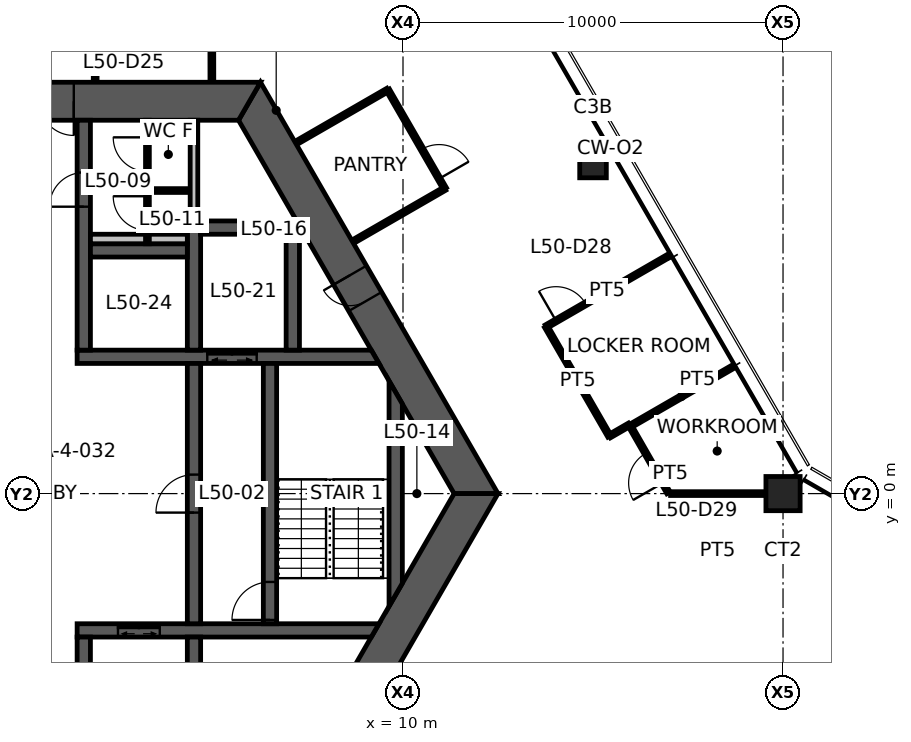
"""IFC4 building model, lengths in metres.
Left out: names, types, materials, properties, quantities, classifications, styles, units other than length and angle.
Written with IfcOpenShell. Run it as: python <this file> out.ifc"""

import sys

from ifc_helpers import new_model, si_unit, direction, frame, frame_2d, origin, origin_2d, place, context, subcontext, project, spatial, polyline, rectangle, hollow_rectangle, outline, extrude, element, fill, save


model = new_model("IFC4")
c1 = context("Model", 3, precision=1e-05, world=origin(), true_north=direction((0.0, 1.0)))
c2 = subcontext(c1, "Body", "Model", "MODEL_VIEW")
j1 = project(units=[si_unit("LENGTHUNIT", "METRE"), si_unit("PLANEANGLEUNIT", "RADIAN")], contexts=[c1])
p1 = place(None, origin())
s1 = spatial("IfcSite", under=j1, at=p1, CompositionType="ELEMENT")
p2 = place(p1, origin())
s2 = spatial("IfcBuilding", under=s1, at=p2, CompositionType="ELEMENT")
p3 = place(p2, frame((0.0, 0.0, 199.4)))
s3 = spatial("IfcBuildingStorey", under=s2, at=p3, CompositionType="ELEMENT", Elevation=199.4)
p4 = place(p3, frame((20.0, 0.0, 0.0), z_axis=(0.0, 0.0, 1.0), x_axis=(1.0, 0.0, 0.0)))
e1 = element("IfcColumn", 1, at=p4, inside=s3, PredefinedType="COLUMN", context=c2, shape_type="SweptSolid", body=[
    extrude(hollow_rectangle(XDim=0.9, YDim=0.9, WallThickness=0.09, at=origin_2d()), origin(), (0.0, 0.0, 1.0), 3.9),
])
p5 = place(p3, frame((15.0, 8.66, 0.0), z_axis=(0.0, 0.0, 1.0), x_axis=(1.0, 0.0, 0.0)))
e2 = element("IfcColumn", 2, at=p5, inside=s3, PredefinedType="COLUMN", context=c2, shape_type="SweptSolid", body=[
    extrude(hollow_rectangle(XDim=0.7, YDim=0.7, WallThickness=0.036, at=origin_2d()), origin(), (0.0, 0.0, 1.0), 3.9),
])
p6 = place(p3, frame((11.922, 0.0, 0.0), z_axis=(0.0, 0.0, 1.0), x_axis=(-0.500004296715, 0.866022923061, 0.0)))
e3 = element("IfcWall", 3, at=p6, inside=s3, PredefinedType="SHEAR", context=c2, shape_type="SweptSolid", body=[
    extrude(outline(polyline([(-0.289, -0.5), (5.835, -0.5), (6.635, -0.5), (12.211, -0.5), (11.634, 0.5), (6.635, 0.5), (5.835, 0.5), (0.289, 0.5), (-0.289, -0.5)])), origin(), (0.0, 0.0, 1.0), 3.9),
])
p7 = place(p6, frame((5.835, 0.0, 0.0)))
e4 = element("IfcOpeningElement", 4, at=p7, cuts=e3, PredefinedType="OPENING", context=c2, shape_type="SweptSolid", body=[
    extrude(rectangle(XDim=0.8, YDim=2.1, at=frame_2d((0.4, 1.05))), frame((0.0, 0.51, 0.0), z_axis=(0.0, -1.0, 0.0), x_axis=(1.0, 0.0, 0.0)), (0.0, 0.0, 1.0), 1.02),
])
p8 = place(p3, frame((5.961, 10.325, 0.0), z_axis=(0.0, 0.0, 1.0), x_axis=(-1.0, 0.0, 0.0)))
e5 = element("IfcWall", 5, at=p8, inside=s3, PredefinedType="SHEAR", context=c2, shape_type="SweptSolid", body=[
    extrude(outline(polyline([(-0.289, -0.5), (4.624, -0.5), (5.523, -0.5), (6.399, -0.5), (7.299, -0.5), (12.211, -0.5), (11.634, 0.5), (7.299, 0.5), (6.399, 0.5), (5.523, 0.5), (4.624, 0.5), (0.289, 0.5), (-0.289, -0.5)])), origin(), (0.0, 0.0, 1.0), 3.9),
])
p9 = place(p8, frame((6.399, 0.0, 0.0)))
e6 = element("IfcOpeningElement", 6, at=p9, cuts=e5, PredefinedType="OPENING", context=c2, shape_type="SweptSolid", body=[
    extrude(rectangle(XDim=0.9, YDim=2.1, at=frame_2d((0.45, 1.05))), frame((0.0, 0.51, 0.0), z_axis=(0.0, -1.0, 0.0), x_axis=(1.0, 0.0, 0.0)), (0.0, 0.0, 1.0), 1.02),
])
p10 = place(p8, frame((4.624, 0.0, 0.0)))
e7 = element("IfcOpeningElement", 7, at=p10, cuts=e5, PredefinedType="OPENING", context=c2, shape_type="SweptSolid", body=[
    extrude(rectangle(XDim=0.9, YDim=2.1, at=frame_2d((0.45, 1.05))), frame((0.0, 0.51, 0.0), z_axis=(0.0, -1.0, 0.0), x_axis=(1.0, 0.0, 0.0)), (0.0, 0.0, 1.0), 1.02),
])
p11 = place(p3, frame((5.961, -10.325, 0.0), z_axis=(0.0, 0.0, 1.0), x_axis=(0.500004296715, 0.866022923061, 0.0)))
e8 = element("IfcWall", 8, at=p11, inside=s3, PredefinedType="SHEAR", context=c2, shape_type="SweptSolid", body=[
    extrude(outline(polyline([(-0.289, -0.5), (4.594, -0.5), (5.394, -0.5), (12.211, -0.5), (11.634, 0.5), (5.394, 0.5), (4.594, 0.5), (0.289, 0.5), (-0.289, -0.5)])), origin(), (0.0, 0.0, 1.0), 3.9),
])
p12 = place(p11, frame((4.594, 0.0, 0.0)))
e9 = element("IfcOpeningElement", 9, at=p12, cuts=e8, PredefinedType="OPENING", context=c2, shape_type="SweptSolid", body=[
    extrude(rectangle(XDim=0.8, YDim=2.1, at=frame_2d((0.4, 1.05))), frame((0.0, 0.51, 0.0), z_axis=(0.0, -1.0, 0.0), x_axis=(1.0, 0.0, 0.0)), (0.0, 0.0, 1.0), 1.02),
])
p13 = place(p3, frame((1.425, 3.6, 0.0), z_axis=(0.0, 0.0, 1.0), x_axis=(1.0, 0.0, 0.0)))
e10 = element("IfcWall", 10, at=p13, inside=s3, PredefinedType="SHEAR", context=c2, shape_type="SweptSolid", body=[
    extrude(outline(polyline([(0.0, -0.175), (3.425, -0.175), (4.725, -0.175), (7.942, -0.175), (7.74, 0.175), (4.725, 0.175), (3.425, 0.175), (0.0, 0.175), (0.0, -0.175)])), origin(), (0.0, 0.0, 1.0), 3.9),
])
p14 = place(p13, frame((3.425, 0.0, 0.0)))
e11 = element("IfcOpeningElement", 11, at=p14, cuts=e10, PredefinedType="OPENING", context=c2, shape_type="SweptSolid", body=[
    extrude(rectangle(XDim=1.3, YDim=2.1, at=frame_2d((0.65, 1.05))), frame((0.0, 0.185, 0.0), z_axis=(0.0, -1.0, 0.0), x_axis=(1.0, 0.0, 0.0)), (0.0, 0.0, 1.0), 0.37),
])
p15 = place(p3, frame((1.425, -3.6, 0.0), z_axis=(0.0, 0.0, 1.0), x_axis=(1.0, 0.0, 0.0)))
e12 = element("IfcWall", 12, at=p15, inside=s3, PredefinedType="SHEAR", context=c2, shape_type="SweptSolid", body=[
    extrude(outline(polyline([(0.0, -0.175), (1.075, -0.175), (2.175, -0.175), (7.74, -0.175), (7.942, 0.175), (2.175, 0.175), (1.075, 0.175), (0.0, 0.175), (0.0, -0.175)])), origin(), (0.0, 0.0, 1.0), 3.9),
])
p16 = place(p15, frame((1.075, 0.0, 0.0)))
e13 = element("IfcOpeningElement", 13, at=p16, cuts=e12, PredefinedType="OPENING", context=c2, shape_type="SweptSolid", body=[
    extrude(rectangle(XDim=1.1, YDim=2.1, at=frame_2d((0.55, 1.05))), frame((0.0, 0.185, 0.0), z_axis=(0.0, -1.0, 0.0), x_axis=(1.0, 0.0, 0.0)), (0.0, 0.0, 1.0), 0.37),
])
p17 = place(p3, frame((1.6, 3.775, 0.0), z_axis=(0.0, 0.0, 1.0), x_axis=(0.0, 1.0, 0.0)))
e14 = element("IfcWall", 14, at=p17, inside=s3, PredefinedType="SHEAR", context=c2, shape_type="SweptSolid", body=[
    extrude(rectangle(XDim=6.05, YDim=0.35, at=frame_2d((3.025, 0.0))), origin(), (0.0, 0.0, 1.0), 3.9),
])
p18 = place(p17, frame((3.775, 0.0, 0.0)))
e15 = element("IfcOpeningElement", 15, at=p18, cuts=e14, PredefinedType="OPENING", context=c2, shape_type="SweptSolid", body=[
    extrude(rectangle(XDim=0.9, YDim=2.1, at=frame_2d((0.45, 1.05))), frame((0.0, 0.185, 0.0), z_axis=(0.0, -1.0, 0.0), x_axis=(1.0, 0.0, 0.0)), (0.0, 0.0, 1.0), 0.37),
])
p19 = place(p3, frame((1.6, -3.775, 0.0), z_axis=(0.0, 0.0, 1.0), x_axis=(0.0, -1.0, 0.0)))
e16 = element("IfcWall", 16, at=p19, inside=s3, PredefinedType="SHEAR", context=c2, shape_type="SweptSolid", body=[
    extrude(rectangle(XDim=6.05, YDim=0.35, at=frame_2d((3.025, 0.0))), origin(), (0.0, 0.0, 1.0), 3.9),
])
p20 = place(p19, frame((3.625, 0.0, 0.0)))
e17 = element("IfcOpeningElement", 17, at=p20, cuts=e16, PredefinedType="OPENING", context=c2, shape_type="SweptSolid", body=[
    extrude(rectangle(XDim=1.2, YDim=2.1, at=frame_2d((0.6, 1.05))), frame((0.0, 0.185, 0.0), z_axis=(0.0, -1.0, 0.0), x_axis=(1.0, 0.0, 0.0)), (0.0, 0.0, 1.0), 0.37),
])
p21 = place(p3, frame((4.5, -3.425, 0.0), z_axis=(0.0, 0.0, 1.0), x_axis=(0.0, 1.0, 0.0)))
e18 = element("IfcWall", 18, at=p21, inside=s3, PredefinedType="SHEAR", context=c2, shape_type="SweptSolid", body=[
    extrude(rectangle(XDim=6.85, YDim=0.35, at=frame_2d((3.425, 0.0))), origin(), (0.0, 0.0, 1.0), 3.9),
])
p22 = place(p21, frame((2.925, 0.0, 0.0)))
e19 = element("IfcOpeningElement", 19, at=p22, cuts=e18, PredefinedType="OPENING", context=c2, shape_type="SweptSolid", body=[
    extrude(rectangle(XDim=1.0, YDim=2.1, at=frame_2d((0.5, 1.05))), frame((0.0, 0.185, 0.0), z_axis=(0.0, -1.0, 0.0), x_axis=(1.0, 0.0, 0.0)), (0.0, 0.0, 1.0), 0.37),
])
p23 = place(p3, frame((6.5, -3.425, 0.0), z_axis=(0.0, 0.0, 1.0), x_axis=(0.0, 1.0, 0.0)))
e20 = element("IfcWall", 20, at=p23, inside=s3, PredefinedType="SHEAR", context=c2, shape_type="SweptSolid", body=[
    extrude(rectangle(XDim=6.85, YDim=0.35, at=frame_2d((3.425, 0.0))), origin(), (0.0, 0.0, 1.0), 3.9),
])
p24 = place(p23, frame((0.1, 0.0, 0.0)))
e21 = element("IfcOpeningElement", 21, at=p24, cuts=e20, PredefinedType="OPENING", context=c2, shape_type="SweptSolid", body=[
    extrude(rectangle(XDim=1.0, YDim=2.1, at=frame_2d((0.5, 1.05))), frame((0.0, 0.185, 0.0), z_axis=(0.0, -1.0, 0.0), x_axis=(1.0, 0.0, 0.0)), (0.0, 0.0, 1.0), 0.37),
])
p25 = place(p3, frame((4.5, 3.775, 0.0), z_axis=(0.0, 0.0, 1.0), x_axis=(0.0, 1.0, 0.0)))
e22 = element("IfcWall", 22, at=p25, inside=s3, PredefinedType="SHEAR", context=c2, shape_type="SweptSolid", body=[
    extrude(rectangle(XDim=3.4, YDim=0.35, at=frame_2d((1.7, 0.0))), origin(), (0.0, 0.0, 1.0), 3.9),
])
p26 = place(p3, frame((4.5, -3.775, 0.0), z_axis=(0.0, 0.0, 1.0), x_axis=(0.0, -1.0, 0.0)))
e23 = element("IfcWall", 23, at=p26, inside=s3, PredefinedType="SHEAR", context=c2, shape_type="SweptSolid", body=[
    extrude(rectangle(XDim=6.05, YDim=0.35, at=frame_2d((3.025, 0.0))), origin(), (0.0, 0.0, 1.0), 3.9),
])
p27 = place(p3, frame((1.775, 6.4, 0.0), z_axis=(0.0, 0.0, 1.0), x_axis=(1.0, 0.0, 0.0)))
e24 = element("IfcWall", 24, at=p27, inside=s3, PredefinedType="SHEAR", context=c2, shape_type="SweptSolid", body=[
    extrude(rectangle(XDim=2.55, YDim=0.35, at=frame_2d((1.275, 0.0))), origin(), (0.0, 0.0, 1.0), 3.9),
])
p28 = place(p3, frame((4.675, 7.0, 0.0), z_axis=(0.0, 0.0, 1.0), x_axis=(1.0, 0.0, 0.0)))
e25 = element("IfcWall", 25, at=p28, inside=s3, PredefinedType="SHEAR", context=c2, shape_type="SweptSolid", body=[
    extrude(rectangle(XDim=2.25, YDim=0.35, at=frame_2d((1.125, 0.0))), origin(), (0.0, 0.0, 1.0), 3.9),
])
p29 = place(p3, frame((7.1, 3.775, 0.0), z_axis=(0.0, 0.0, 1.0), x_axis=(0.0, 1.0, 0.0)))
e26 = element("IfcWall", 26, at=p29, inside=s3, PredefinedType="SHEAR", context=c2, shape_type="SweptSolid", body=[
    extrude(outline(polyline([(0.0, -0.175), (3.274, -0.175), (3.4, 0.0), (3.4, 0.175), (0.0, 0.175), (0.0, -0.175)])), origin(), (0.0, 0.0, 1.0), 3.9),
])
p30 = place(p3, frame((9.808, -2.662, 0.0), z_axis=(0.0, 0.0, 1.0), x_axis=(0.0, 1.0, 0.0)))
e27 = element("IfcWall", 27, at=p30, inside=s3, PredefinedType="SHEAR", context=c2, shape_type="SweptSolid", body=[
    extrude(outline(polyline([(0.303, -0.175), (5.021, -0.175), (5.628, 0.175), (-0.303, 0.175), (0.303, -0.175)])), origin(), (0.0, 0.0, 1.0), 3.9),
])
p31 = place(p3, frame((4.5, 7.175, 0.0), z_axis=(0.0, 0.0, 1.0), x_axis=(0.0, 1.0, 0.0)))
e28 = element("IfcWall", 28, at=p31, inside=s3, PredefinedType="STANDARD", context=c2, shape_type="SweptSolid", body=[
    extrude(rectangle(XDim=2.65, YDim=0.2, at=frame_2d((1.325, 0.0))), origin(), (0.0, 0.0, 1.0), 3.9),
])
p32 = place(p3, frame((1.775, 6.7, 0.0), z_axis=(0.0, 0.0, 1.0), x_axis=(1.0, 0.0, 0.0)))
e29 = element("IfcWall", 29, at=p32, inside=s3, PredefinedType="PLUMBINGWALL", context=c2, shape_type="SweptSolid", body=[
    extrude(rectangle(XDim=2.55, YDim=0.25, at=frame_2d((1.275, 0.0))), origin(), (0.0, 0.0, 1.0), 3.9),
])
p33 = place(p3, frame((3.275, 6.575, 0.0), z_axis=(0.0, 0.0, 1.0), x_axis=(0.0, 1.0, 0.0)))
e30 = element("IfcWall", 30, at=p33, inside=s3, PredefinedType="PARTITIONING", context=c2, shape_type="SweptSolid", body=[
    extrude(rectangle(XDim=3.25, YDim=0.1, at=frame_2d((1.625, 0.0))), origin(), (0.0, 0.0, 1.0), 2.35),
])
p34 = place(p33, frame((1.9, 0.0, 0.0)))
e31 = element("IfcOpeningElement", 31, at=p34, cuts=e30, PredefinedType="OPENING", context=c2, shape_type="SweptSolid", body=[
    extrude(rectangle(XDim=0.9, YDim=2.1, at=frame_2d((0.45, 1.05))), frame((0.0, 0.06, 0.0), z_axis=(0.0, -1.0, 0.0), x_axis=(1.0, 0.0, 0.0)), (0.0, 0.0, 1.0), 0.12),
])
p35 = place(p33, frame((0.35, 0.0, 0.0)))
e32 = element("IfcOpeningElement", 32, at=p35, cuts=e30, PredefinedType="OPENING", context=c2, shape_type="SweptSolid", body=[
    extrude(rectangle(XDim=0.9, YDim=2.1, at=frame_2d((0.45, 1.05))), frame((0.0, 0.06, 0.0), z_axis=(0.0, -1.0, 0.0), x_axis=(1.0, 0.0, 0.0)), (0.0, 0.0, 1.0), 0.12),
])
p36 = place(p3, frame((3.325, 7.975, 0.0), z_axis=(0.0, 0.0, 1.0), x_axis=(1.0, 0.0, 0.0)))
e33 = element("IfcWall", 33, at=p36, inside=s3, PredefinedType="PARTITIONING", context=c2, shape_type="SweptSolid", body=[
    extrude(rectangle(XDim=1.0, YDim=0.1, at=frame_2d((0.5, 0.0))), origin(), (0.0, 0.0, 1.0), 2.35),
])
for number, where, z_axis, x_axis in (
    (34, (1.9, 10.845, 0.0), (0.0, 0.0, 1.0), (0.002, 1.0, 0.0)),
    (35, (4.966, 13.625, 0.0), (0.0, 0.0, 1.0), (0.002, -1.0, 0.0)),
):
    element("IfcWall", number, at=place(p3, frame(where, z_axis=z_axis, x_axis=x_axis)), inside=s3, PredefinedType="PARTITIONING", context=c2, shape_type="SweptSolid", body=[
        extrude(rectangle(XDim=2.78, YDim=0.1, at=frame_2d((1.39, 0.0))), origin(), (0.0, 0.0, 1.0), 2.35),
    ])
p37 = place(p3, frame((7.192, 9.233, 0.0), z_axis=(0.0, 0.0, 1.0), x_axis=(0.866018876994, 0.500011304563, 0.0)))
e36 = element("IfcWall", 36, at=p37, inside=s3, PredefinedType="PARTITIONING", context=c2, shape_type="SweptSolid", body=[
    extrude(rectangle(XDim=2.78, YDim=0.1, at=frame_2d((1.39, 0.0))), origin(), (0.0, 0.0, 1.0), 2.35),
])
p38 = place(p3, frame((9.6, 10.623, 0.0), z_axis=(0.0, 0.0, 1.0), x_axis=(0.499990139034, -0.866031096941, 0.0)))
e37 = element("IfcWall", 37, at=p38, inside=s3, PredefinedType="PARTITIONING", context=c2, shape_type="SweptSolid", body=[
    extrude(rectangle(XDim=3.0, YDim=0.1, at=frame_2d((1.5, 0.0))), origin(), (0.0, 0.0, 1.0), 2.35),
])
p39 = place(p38, frame((1.8, 0.0, 0.0)))
e38 = element("IfcOpeningElement", 38, at=p39, cuts=e37, PredefinedType="OPENING", context=c2, shape_type="SweptSolid", body=[
    extrude(rectangle(XDim=0.9, YDim=2.1, at=frame_2d((0.45, 1.05))), frame((0.0, 0.06, 0.0), z_axis=(0.0, -1.0, 0.0), x_axis=(1.0, 0.0, 0.0)), (0.0, 0.0, 1.0), 0.12),
])
p40 = place(p3, frame((11.1, 8.025, 0.0), z_axis=(0.0, 0.0, 1.0), x_axis=(-0.866056901187, -0.49994544093, 0.0)))
e39 = element("IfcWall", 39, at=p40, inside=s3, PredefinedType="PARTITIONING", context=c2, shape_type="SweptSolid", body=[
    extrude(rectangle(XDim=2.78, YDim=0.1, at=frame_2d((1.39, 0.0))), origin(), (0.0, 0.0, 1.0), 2.35),
])
p41 = place(p3, frame((18.679, 3.335, 0.0), z_axis=(0.0, 0.0, 1.0), x_axis=(-0.866045268016, -0.499965592563, 0.0)))
e40 = element("IfcWall", 40, at=p41, inside=s3, PredefinedType="PARTITIONING", context=c2, shape_type="SweptSolid", body=[
    extrude(rectangle(XDim=3.129, YDim=0.1, at=frame_2d((1.564, 0.0))), origin(), (0.0, 0.0, 1.0), 2.35),
])
p42 = place(p3, frame((13.767, 4.395, 0.0), z_axis=(0.0, 0.0, 1.0), x_axis=(0.866028673236, 0.499994337101, 0.0)))
e41 = element("IfcWall", 41, at=p42, inside=s3, PredefinedType="PARTITIONING", context=c2, shape_type="SweptSolid", body=[
    extrude(rectangle(XDim=3.705, YDim=0.1, at=frame_2d((1.853, 0.0))), origin(), (0.0, 0.0, 1.0), 2.35),
])
p43 = place(p42, frame((0.3, 0.0, 0.0)))
e42 = element("IfcOpeningElement", 42, at=p43, cuts=e41, PredefinedType="OPENING", context=c2, shape_type="SweptSolid", body=[
    extrude(rectangle(XDim=0.9, YDim=2.1, at=frame_2d((0.45, 1.05))), frame((0.0, 0.06, 0.0), z_axis=(0.0, -1.0, 0.0), x_axis=(1.0, 0.0, 0.0)), (0.0, 0.0, 1.0), 0.12),
])
p44 = place(p3, frame((15.433, 1.51, 0.0), z_axis=(0.0, 0.0, 1.0), x_axis=(-0.500001606164, 0.866024476463, 0.0)))
e43 = element("IfcWall", 43, at=p44, inside=s3, PredefinedType="PARTITIONING", context=c2, shape_type="SweptSolid", body=[
    extrude(rectangle(XDim=3.331, YDim=0.1, at=frame_2d((1.666, 0.0))), origin(), (0.0, 0.0, 1.0), 2.35),
])
p45 = place(p3, frame((15.956, 1.813, 0.0), z_axis=(0.0, 0.0, 1.0), x_axis=(-0.865997239347, -0.500048779063, 0.0)))
e44 = element("IfcWall", 44, at=p45, inside=s3, PredefinedType="PARTITIONING", context=c2, shape_type="SweptSolid", body=[
    extrude(rectangle(XDim=0.604, YDim=0.1, at=frame_2d((0.302, 0.0))), origin(), (0.0, 0.0, 1.0), 2.35),
])
p46 = place(p3, frame((16.986, 0.02, 0.0), z_axis=(0.0, 0.0, 1.0), x_axis=(-0.498033790128, 0.86715762344, 0.0)))
e45 = element("IfcWall", 45, at=p46, inside=s3, PredefinedType="PARTITIONING", context=c2, shape_type="SweptSolid", body=[
    extrude(rectangle(XDim=2.025, YDim=0.1, at=frame_2d((1.012, 0.0))), origin(), (0.0, 0.0, 1.0), 2.35),
])
p47 = place(p46, frame((0.3, 0.0, 0.0)))
e46 = element("IfcOpeningElement", 46, at=p47, cuts=e45, PredefinedType="OPENING", context=c2, shape_type="SweptSolid", body=[
    extrude(rectangle(XDim=0.9, YDim=2.1, at=frame_2d((0.45, 1.05))), frame((0.0, 0.06, 0.0), z_axis=(0.0, -1.0, 0.0), x_axis=(1.0, 0.0, 0.0)), (0.0, 0.0, 1.0), 0.12),
])
p48 = place(p3, frame((20.792, -5.769, 0.0), z_axis=(0.0, 0.0, 1.0), x_axis=(0.500005339912, 0.866022320763, 0.0)))
e47 = element("IfcWall", 47, at=p48, inside=s3, PredefinedType="PARTITIONING", context=c2, shape_type="SweptSolid", body=[
    extrude(rectangle(XDim=5.08, YDim=0.1, at=frame_2d((2.54, 0.0))), origin(), (0.0, 0.0, 1.0), 2.35),
])
p49 = place(p3, frame((19.519, 0.0, 0.0), z_axis=(0.0, 0.0, 1.0), x_axis=(-1.0, 0.0, 0.0)))
e48 = element("IfcWall", 48, at=p49, inside=s3, PredefinedType="PARTITIONING", context=c2, shape_type="SweptSolid", body=[
    extrude(rectangle(XDim=2.478, YDim=0.1, at=frame_2d((1.239, 0.0))), origin(), (0.0, 0.0, 1.0), 2.35),
])
p50 = place(p10, origin())
e49 = element("IfcDoor", 49, at=p50, inside=s3, OperationType="SINGLE_SWING_LEFT", PredefinedType="DOOR", context=c2, shape_type="SweptSolid", body=[
    extrude(rectangle(XDim=0.9, YDim=2.1, at=frame_2d((0.45, 1.05))), frame((0.0, 0.025, 0.0), z_axis=(0.0, -1.0, 0.0), x_axis=(1.0, 0.0, 0.0)), (0.0, 0.0, 1.0), 0.05),
])
fill(e7, e49)
p51 = place(p7, origin())
e50 = element("IfcDoor", 50, at=p51, inside=s3, OperationType="SINGLE_SWING_RIGHT", PredefinedType="DOOR", context=c2, shape_type="SweptSolid", body=[
    extrude(rectangle(XDim=0.8, YDim=2.1, at=frame_2d((0.4, 1.05))), frame((0.0, 0.025, 0.0), z_axis=(0.0, -1.0, 0.0), x_axis=(1.0, 0.0, 0.0)), (0.0, 0.0, 1.0), 0.05),
])
fill(e4, e50)
p52 = place(p22, origin())
e51 = element("IfcDoor", 51, at=p52, inside=s3, OperationType="SINGLE_SWING_LEFT", PredefinedType="DOOR", context=c2, shape_type="SweptSolid", body=[
    extrude(rectangle(XDim=1.0, YDim=2.1, at=frame_2d((0.5, 1.05))), frame((0.0, 0.025, 0.0), z_axis=(0.0, -1.0, 0.0), x_axis=(1.0, 0.0, 0.0)), (0.0, 0.0, 1.0), 0.05),
])
fill(e19, e51)
p53 = place(p24, origin())
e52 = element("IfcDoor", 52, at=p53, inside=s3, OperationType="SINGLE_SWING_LEFT", PredefinedType="DOOR", context=c2, shape_type="SweptSolid", body=[
    extrude(rectangle(XDim=1.0, YDim=2.1, at=frame_2d((0.5, 1.05))), frame((0.0, 0.025, 0.0), z_axis=(0.0, -1.0, 0.0), x_axis=(1.0, 0.0, 0.0)), (0.0, 0.0, 1.0), 0.05),
])
fill(e21, e52)
p54 = place(p18, origin())
e53 = element("IfcDoor", 53, at=p54, inside=s3, OperationType="SINGLE_SWING_LEFT", PredefinedType="DOOR", context=c2, shape_type="SweptSolid", body=[
    extrude(rectangle(XDim=0.9, YDim=2.1, at=frame_2d((0.45, 1.05))), frame((0.0, 0.025, 0.0), z_axis=(0.0, -1.0, 0.0), x_axis=(1.0, 0.0, 0.0)), (0.0, 0.0, 1.0), 0.05),
])
fill(e15, e53)
p55 = place(p34, origin())
e54 = element("IfcDoor", 54, at=p55, inside=s3, OperationType="SINGLE_SWING_RIGHT", PredefinedType="DOOR", context=c2, shape_type="SweptSolid", body=[
    extrude(rectangle(XDim=0.9, YDim=2.1, at=frame_2d((0.45, 1.05))), frame((0.0, 0.025, 0.0), z_axis=(0.0, -1.0, 0.0), x_axis=(1.0, 0.0, 0.0)), (0.0, 0.0, 1.0), 0.05),
])
fill(e31, e54)
p56 = place(p35, origin())
e55 = element("IfcDoor", 55, at=p56, inside=s3, OperationType="SINGLE_SWING_RIGHT", PredefinedType="DOOR", context=c2, shape_type="SweptSolid", body=[
    extrude(rectangle(XDim=0.9, YDim=2.1, at=frame_2d((0.45, 1.05))), frame((0.0, 0.025, 0.0), z_axis=(0.0, -1.0, 0.0), x_axis=(1.0, 0.0, 0.0)), (0.0, 0.0, 1.0), 0.05),
])
fill(e32, e55)
p57 = place(p39, origin())
e56 = element("IfcDoor", 56, at=p57, inside=s3, OperationType="SINGLE_SWING_RIGHT", PredefinedType="DOOR", context=c2, shape_type="SweptSolid", body=[
    extrude(rectangle(XDim=0.9, YDim=2.1, at=frame_2d((0.45, 1.05))), frame((0.0, 0.025, 0.0), z_axis=(0.0, -1.0, 0.0), x_axis=(1.0, 0.0, 0.0)), (0.0, 0.0, 1.0), 0.05),
])
fill(e38, e56)
p58 = place(p43, origin())
e57 = element("IfcDoor", 57, at=p58, inside=s3, OperationType="SINGLE_SWING_LEFT", PredefinedType="DOOR", context=c2, shape_type="SweptSolid", body=[
    extrude(rectangle(XDim=0.9, YDim=2.1, at=frame_2d((0.45, 1.05))), frame((0.0, 0.025, 0.0), z_axis=(0.0, -1.0, 0.0), x_axis=(1.0, 0.0, 0.0)), (0.0, 0.0, 1.0), 0.05),
])
fill(e42, e57)
p59 = place(p47, origin())
e58 = element("IfcDoor", 58, at=p59, inside=s3, OperationType="SINGLE_SWING_LEFT", PredefinedType="DOOR", context=c2, shape_type="SweptSolid", body=[
    extrude(rectangle(XDim=0.9, YDim=2.1, at=frame_2d((0.45, 1.05))), frame((0.0, 0.025, 0.0), z_axis=(0.0, -1.0, 0.0), x_axis=(1.0, 0.0, 0.0)), (0.0, 0.0, 1.0), 0.05),
])
fill(e46, e58)
p60 = place(p16, origin())
e59 = element("IfcDoor", 59, at=p60, inside=s3, OperationType="DOUBLE_DOOR_SLIDING", PredefinedType="DOOR", context=c2, shape_type="SweptSolid", body=[
    extrude(rectangle(XDim=1.1, YDim=2.1, at=frame_2d((0.55, 1.05))), frame((0.0, 0.025, 0.0), z_axis=(0.0, -1.0, 0.0), x_axis=(1.0, 0.0, 0.0)), (0.0, 0.0, 1.0), 0.05),
])
fill(e13, e59)
p61 = place(p14, origin())
e60 = element("IfcDoor", 60, at=p61, inside=s3, OperationType="DOUBLE_DOOR_SLIDING", PredefinedType="DOOR", context=c2, shape_type="SweptSolid", body=[
    extrude(rectangle(XDim=1.3, YDim=2.1, at=frame_2d((0.65, 1.05))), frame((0.0, 0.025, 0.0), z_axis=(0.0, -1.0, 0.0), x_axis=(1.0, 0.0, 0.0)), (0.0, 0.0, 1.0), 0.05),
])
fill(e11, e60)
save(model, sys.argv[1])
